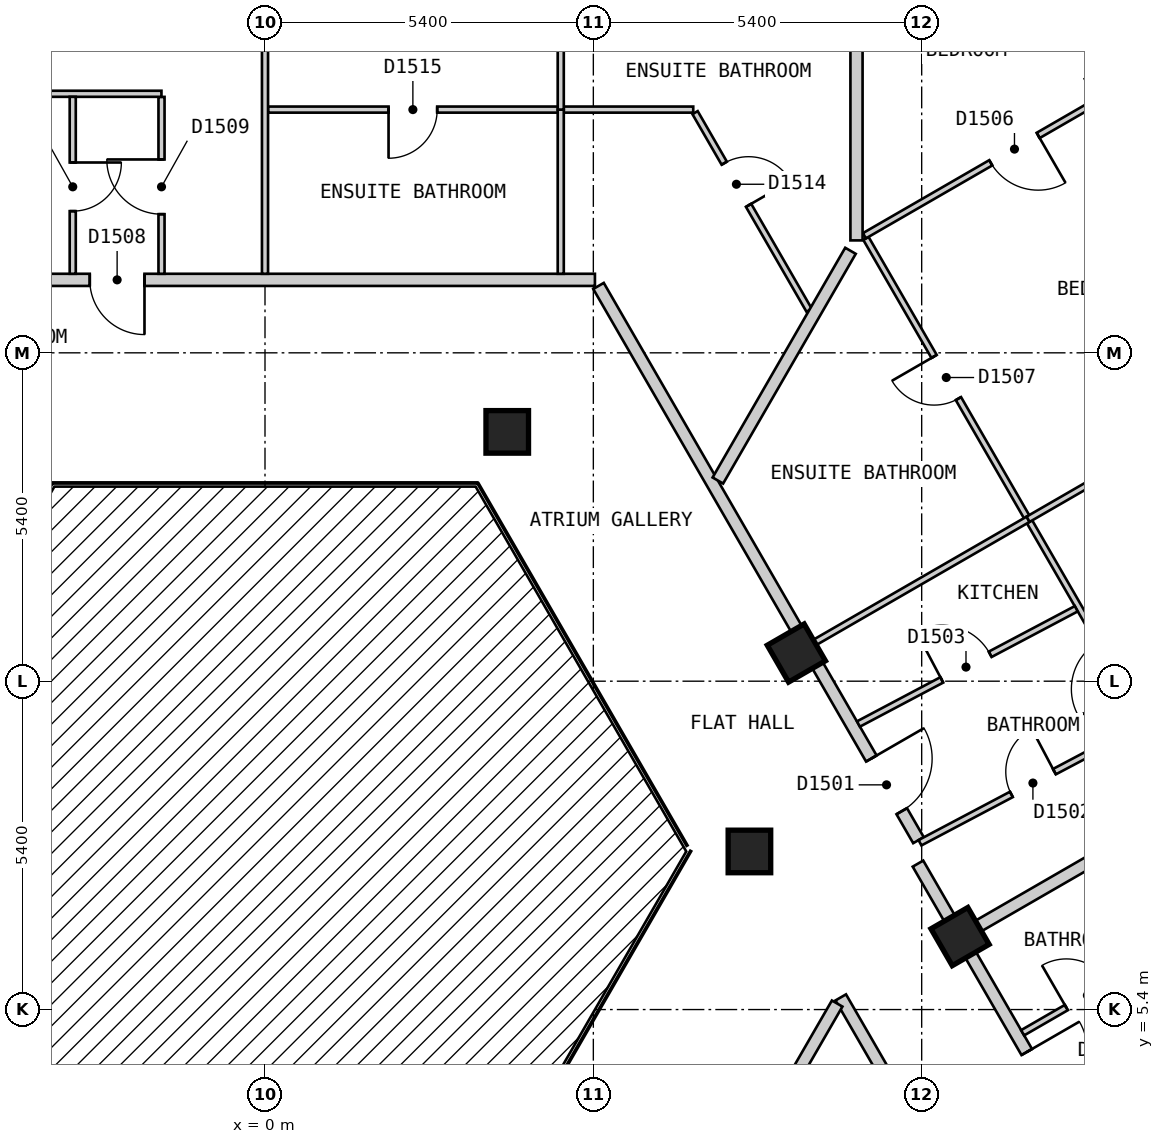
"""IFC4 building model, lengths in metres.
Left out: names, types, materials, properties, quantities, classifications, styles, units other than length and angle.
Written with IfcOpenShell. Run it as: python <this file> out.ifc"""

import sys

from ifc_helpers import new_model, si_unit, direction, frame, frame_2d, origin, origin_2d, place, context, subcontext, project, spatial, rectangle, extrude, element, fill, save


model = new_model("IFC4")
c1 = context("Model", 3, precision=1e-05, world=origin(), true_north=direction((0.0, 1.0)))
c2 = subcontext(c1, "Body", "Model", "MODEL_VIEW")
j1 = project(units=[si_unit("LENGTHUNIT", "METRE"), si_unit("PLANEANGLEUNIT", "RADIAN")], contexts=[c1])
p1 = place(None, origin())
s1 = spatial("IfcSite", under=j1, at=p1, CompositionType="ELEMENT")
p2 = place(p1, origin())
s2 = spatial("IfcBuilding", under=s1, at=p2, CompositionType="ELEMENT")
p3 = place(p2, frame((0.0, 0.0, 196.2)))
s3 = spatial("IfcBuildingStorey", under=s2, at=p3, CompositionType="ELEMENT", Elevation=196.2)
for number, where, z_axis, x_axis in (
    (1, (11.431, 6.6, 0.0), (0.0, 0.0, 1.0), (-0.5, 0.866, 0.0)),
    (2, (7.967, 8.0, 0.0), (0.0, 0.0, 1.0), (1.0, 0.0, 0.0)),
    (3, (8.739, 11.263, 0.0), (0.0, 0.0, 1.0), (-0.5, 0.866, 0.0)),
    (4, (3.984, 14.9, 0.0), (0.0, 0.0, 1.0), (1.0, 0.0, 0.0)),
):
    element("IfcColumn", number, at=place(p3, frame(where, z_axis=z_axis, x_axis=x_axis)), inside=s3, PredefinedType="COLUMN", context=c2, shape_type="SweptSolid", body=[
        extrude(rectangle(XDim=0.7, YDim=0.7, at=origin_2d()), origin(), (0.0, 0.0, 1.0), 3.0),
    ])
p4 = place(p3, frame((9.469, 5.6, 0.0), z_axis=(0.0, 0.0, 1.0), x_axis=(0.499964524401, -0.866045884662, 0.0)))
e5 = element("IfcWall", 5, at=p4, inside=s3, PredefinedType="PARTITIONING", context=c2, shape_type="SweptSolid", body=[
    extrude(rectangle(XDim=7.042, YDim=0.2, at=frame_2d((3.521, 0.0))), origin(), (0.0, 0.0, 1.0), 2.6),
])
p5 = place(p4, frame((3.129, 0.0, 0.0)))
e6 = element("IfcOpeningElement", 6, at=p5, cuts=e5, PredefinedType="OPENING", context=c2, shape_type="SweptSolid", body=[
    extrude(rectangle(XDim=0.9, YDim=2.1, at=frame_2d((0.45, 1.05))), frame((0.0, 0.11, 0.0), z_axis=(0.0, -1.0, 0.0), x_axis=(1.0, 0.0, 0.0)), (0.0, 0.0, 1.0), 0.22),
])
p6 = place(p3, frame((10.739, 7.8, 0.0), z_axis=(0.0, 0.0, 1.0), x_axis=(0.500023726918, -0.866011704609, 0.0)))
e7 = element("IfcWall", 7, at=p6, inside=s3, PredefinedType="PARTITIONING", context=c2, shape_type="SweptSolid", body=[
    extrude(rectangle(XDim=9.47, YDim=0.2, at=frame_2d((4.735, 0.0))), origin(), (0.0, 0.0, 1.0), 2.6),
])
p7 = place(p6, frame((8.168, 0.0, 0.0)))
e8 = element("IfcOpeningElement", 8, at=p7, cuts=e7, PredefinedType="OPENING", context=c2, shape_type="SweptSolid", body=[
    extrude(rectangle(XDim=1.0, YDim=2.1, at=frame_2d((0.5, 1.05))), frame((0.0, 0.11, 0.0), z_axis=(0.0, -1.0, 0.0), x_axis=(1.0, 0.0, 0.0)), (0.0, 0.0, 1.0), 0.22),
])
p8 = place(p6, frame((3.578, 0.0, 0.0)))
e9 = element("IfcOpeningElement", 9, at=p8, cuts=e7, PredefinedType="OPENING", context=c2, shape_type="SweptSolid", body=[
    extrude(rectangle(XDim=1.0, YDim=2.1, at=frame_2d((0.5, 1.05))), frame((0.0, 0.11, 0.0), z_axis=(0.0, -1.0, 0.0), x_axis=(1.0, 0.0, 0.0)), (0.0, 0.0, 1.0), 0.22),
])
p9 = place(p3, frame((5.485, 17.3, 0.0), z_axis=(0.0, 0.0, 1.0), x_axis=(0.499998905622, -0.866026035623, 0.0)))
e10 = element("IfcWall", 10, at=p9, inside=s3, PredefinedType="PARTITIONING", context=c2, shape_type="SweptSolid", body=[
    extrude(rectangle(XDim=10.524, YDim=0.2, at=frame_2d((5.262, 0.0))), origin(), (0.0, 0.0, 1.0), 2.6),
])
p10 = place(p9, frame((8.974, 0.0, 0.0)))
e11 = element("IfcOpeningElement", 11, at=p10, cuts=e10, PredefinedType="OPENING", context=c2, shape_type="SweptSolid", body=[
    extrude(rectangle(XDim=1.0, YDim=2.1, at=frame_2d((0.5, 1.05))), frame((0.0, 0.11, 0.0), z_axis=(0.0, -1.0, 0.0), x_axis=(1.0, 0.0, 0.0)), (0.0, 0.0, 1.0), 0.22),
])
p11 = place(p3, frame((-5.311, 17.4, 0.0), z_axis=(0.0, 0.0, 1.0), x_axis=(1.0, 0.0, 0.0)))
e12 = element("IfcWall", 12, at=p11, inside=s3, PredefinedType="PARTITIONING", context=c2, shape_type="SweptSolid", body=[
    extrude(rectangle(XDim=10.737, YDim=0.2, at=frame_2d((5.369, 0.0))), origin(), (0.0, 0.0, 1.0), 2.6),
])
p12 = place(p11, frame((2.429, 0.0, 0.0)))
e13 = element("IfcOpeningElement", 13, at=p12, cuts=e12, PredefinedType="OPENING", context=c2, shape_type="SweptSolid", body=[
    extrude(rectangle(XDim=0.9, YDim=2.1, at=frame_2d((0.45, 1.05))), frame((0.0, 0.11, 0.0), z_axis=(0.0, -1.0, 0.0), x_axis=(1.0, 0.0, 0.0)), (0.0, 0.0, 1.0), 0.22),
])
p13 = place(p3, frame((7.028, 1.373, 0.0), z_axis=(0.0, 0.0, 1.0), x_axis=(0.499953126767, 0.866052464367, 0.0)))
e14 = element("IfcWall", 14, at=p13, inside=s3, PredefinedType="PARTITIONING", context=c2, shape_type="SweptSolid", body=[
    extrude(rectangle(XDim=4.764, YDim=0.2, at=frame_2d((2.382, 0.0))), origin(), (0.0, 0.0, 1.0), 2.6),
])
p14 = place(p3, frame((7.073, 20.15, 0.0), z_axis=(0.0, 0.0, 1.0), x_axis=(0.499917691695, -0.866072919292, 0.0)))
e15 = element("IfcWall", 15, at=p14, inside=s3, PredefinedType="PARTITIONING", context=c2, shape_type="SweptSolid", body=[
    extrude(rectangle(XDim=3.753, YDim=0.1, at=frame_2d((1.876, 0.0))), origin(), (0.0, 0.0, 1.0), 2.6),
])
p15 = place(p14, frame((0.96, 0.0, 0.0)))
e16 = element("IfcOpeningElement", 16, at=p15, cuts=e15, PredefinedType="OPENING", context=c2, shape_type="SweptSolid", body=[
    extrude(rectangle(XDim=0.8, YDim=2.1, at=frame_2d((0.4, 1.05))), frame((0.0, 0.06, 0.0), z_axis=(0.0, -1.0, 0.0), x_axis=(1.0, 0.0, 0.0)), (0.0, 0.0, 1.0), 0.12),
])
p16 = place(p3, frame((9.883, 18.082, 0.0), z_axis=(0.0, 0.0, 1.0), x_axis=(0.500004428835, -0.86602284678, 0.0)))
e17 = element("IfcWall", 17, at=p16, inside=s3, PredefinedType="PARTITIONING", context=c2, shape_type="SweptSolid", body=[
    extrude(rectangle(XDim=10.618, YDim=0.1, at=frame_2d((5.309, 0.0))), origin(), (0.0, 0.0, 1.0), 2.6),
])
p17 = place(p16, frame((7.657, 0.0, 0.0)))
e18 = element("IfcOpeningElement", 18, at=p17, cuts=e17, PredefinedType="OPENING", context=c2, shape_type="SweptSolid", body=[
    extrude(rectangle(XDim=0.9, YDim=2.1, at=frame_2d((0.45, 1.05))), frame((0.0, 0.06, 0.0), z_axis=(0.0, -1.0, 0.0), x_axis=(1.0, 0.0, 0.0)), (0.0, 0.0, 1.0), 0.12),
])
p18 = place(p16, frame((2.242, 0.0, 0.0)))
e19 = element("IfcOpeningElement", 19, at=p18, cuts=e17, PredefinedType="OPENING", context=c2, shape_type="SweptSolid", body=[
    extrude(rectangle(XDim=0.8, YDim=2.1, at=frame_2d((0.4, 1.05))), frame((0.0, 0.06, 0.0), z_axis=(0.0, -1.0, 0.0), x_axis=(1.0, 0.0, 0.0)), (0.0, 0.0, 1.0), 0.12),
])
p19 = place(p3, frame((-1.702, 20.409, 0.0), z_axis=(0.0, 0.0, 1.0), x_axis=(0.0, -1.0, 0.0)))
e20 = element("IfcWall", 20, at=p19, inside=s3, PredefinedType="PARTITIONING", context=c2, shape_type="SweptSolid", body=[
    extrude(rectangle(XDim=2.909, YDim=0.1, at=frame_2d((1.455, 0.0))), origin(), (0.0, 0.0, 1.0), 2.6),
])
p20 = place(p19, frame((1.029, 0.0, 0.0)))
e21 = element("IfcOpeningElement", 21, at=p20, cuts=e20, PredefinedType="OPENING", context=c2, shape_type="SweptSolid", body=[
    extrude(rectangle(XDim=0.9, YDim=2.1, at=frame_2d((0.45, 1.05))), frame((0.0, 0.06, 0.0), z_axis=(0.0, -1.0, 0.0), x_axis=(1.0, 0.0, 0.0)), (0.0, 0.0, 1.0), 0.12),
])
p21 = place(p3, frame((0.05, 20.2, 0.0), z_axis=(0.0, 0.0, 1.0), x_axis=(1.0, 0.0, 0.0)))
e22 = element("IfcWall", 22, at=p21, inside=s3, PredefinedType="PARTITIONING", context=c2, shape_type="SweptSolid", body=[
    extrude(rectangle(XDim=6.993, YDim=0.1, at=frame_2d((3.497, 0.0))), origin(), (0.0, 0.0, 1.0), 2.6),
])
p22 = place(p21, frame((1.982, 0.0, 0.0)))
e23 = element("IfcOpeningElement", 23, at=p22, cuts=e22, PredefinedType="OPENING", context=c2, shape_type="SweptSolid", body=[
    extrude(rectangle(XDim=0.8, YDim=2.1, at=frame_2d((0.4, 1.05))), frame((0.0, 0.06, 0.0), z_axis=(0.0, -1.0, 0.0), x_axis=(1.0, 0.0, 0.0)), (0.0, 0.0, 1.0), 0.12),
])
p23 = place(p3, frame((-4.814, 20.46, 0.0), z_axis=(0.0, 0.0, 1.0), x_axis=(1.0, 0.0, 0.0)))
e24 = element("IfcWall", 24, at=p23, inside=s3, PredefinedType="PARTITIONING", context=c2, shape_type="SweptSolid", body=[
    extrude(rectangle(XDim=3.111, YDim=0.1, at=frame_2d((1.556, 0.0))), origin(), (0.0, 0.0, 1.0), 2.6),
])
p24 = place(p3, frame((4.864, 17.5, 0.0), z_axis=(0.0, 0.0, 1.0), x_axis=(0.0, 1.0, 0.0)))
e25 = element("IfcWall", 25, at=p24, inside=s3, PredefinedType="PARTITIONING", context=c2, shape_type="SweptSolid", body=[
    extrude(rectangle(XDim=2.7, YDim=0.1, at=frame_2d((1.35, 0.0))), origin(), (0.0, 0.0, 1.0), 2.6),
])
p25 = place(p3, frame((0.0, 17.5, 0.0), z_axis=(0.0, 0.0, 1.0), x_axis=(0.0, 1.0, 0.0)))
e26 = element("IfcWall", 26, at=p25, inside=s3, PredefinedType="PARTITIONING", context=c2, shape_type="SweptSolid", body=[
    extrude(rectangle(XDim=6.4, YDim=0.1, at=frame_2d((3.2, 0.0))), origin(), (0.0, 0.0, 1.0), 2.6),
])
p26 = place(p25, frame((4.1, 0.0, 0.0)))
e27 = element("IfcOpeningElement", 27, at=p26, cuts=e26, PredefinedType="OPENING", context=c2, shape_type="SweptSolid", body=[
    extrude(rectangle(XDim=0.9, YDim=2.1, at=frame_2d((0.45, 1.05))), frame((0.0, 0.06, 0.0), z_axis=(0.0, -1.0, 0.0), x_axis=(1.0, 0.0, 0.0)), (0.0, 0.0, 1.0), 0.12),
])
p27 = place(p3, frame((-3.162, 17.5, 0.0), z_axis=(0.0, 0.0, 1.0), x_axis=(0.0, 1.0, 0.0)))
e28 = element("IfcWall", 28, at=p27, inside=s3, PredefinedType="PARTITIONING", context=c2, shape_type="SweptSolid", body=[
    extrude(rectangle(XDim=2.91, YDim=0.1, at=frame_2d((1.455, 0.0))), origin(), (0.0, 0.0, 1.0), 2.6),
])
p28 = place(p27, frame((1.03, 0.0, 0.0)))
e29 = element("IfcOpeningElement", 29, at=p28, cuts=e28, PredefinedType="OPENING", context=c2, shape_type="SweptSolid", body=[
    extrude(rectangle(XDim=0.8, YDim=2.1, at=frame_2d((0.4, 1.05))), frame((0.0, 0.06, 0.0), z_axis=(0.0, -1.0, 0.0), x_axis=(1.0, 0.0, 0.0)), (0.0, 0.0, 1.0), 0.12),
])
p29 = place(p3, frame((9.76, 10.096, 0.0), z_axis=(0.0, 0.0, 1.0), x_axis=(0.883925629136, 0.467627503636, 0.0)))
e30 = element("IfcWall", 30, at=p29, inside=s3, PredefinedType="PARTITIONING", context=c2, shape_type="SweptSolid", body=[
    extrude(rectangle(XDim=4.052, YDim=0.1, at=frame_2d((2.026, 0.0))), origin(), (0.0, 0.0, 1.0), 2.6),
])
p30 = place(p29, frame((1.551, 0.0, 0.0)))
e31 = element("IfcOpeningElement", 31, at=p30, cuts=e30, PredefinedType="OPENING", context=c2, shape_type="SweptSolid", body=[
    extrude(rectangle(XDim=0.9, YDim=2.1, at=frame_2d((0.45, 1.05))), frame((0.0, 0.06, 0.0), z_axis=(0.0, -1.0, 0.0), x_axis=(1.0, 0.0, 0.0)), (0.0, 0.0, 1.0), 0.12),
])
p31 = place(p3, frame((10.772, 8.143, 0.0), z_axis=(0.0, 0.0, 1.0), x_axis=(0.884049480227, 0.467393320995, 0.0)))
e32 = element("IfcWall", 32, at=p31, inside=s3, PredefinedType="PARTITIONING", context=c2, shape_type="SweptSolid", body=[
    extrude(rectangle(XDim=4.153, YDim=0.1, at=frame_2d((2.076, 0.0))), origin(), (0.0, 0.0, 1.0), 2.6),
])
p32 = place(p31, frame((1.701, 0.0, 0.0)))
e33 = element("IfcOpeningElement", 33, at=p32, cuts=e32, PredefinedType="OPENING", context=c2, shape_type="SweptSolid", body=[
    extrude(rectangle(XDim=0.8, YDim=2.1, at=frame_2d((0.4, 1.05))), frame((0.0, 0.06, 0.0), z_axis=(0.0, -1.0, 0.0), x_axis=(1.0, 0.0, 0.0)), (0.0, 0.0, 1.0), 0.12),
])
p33 = place(p3, frame((13.268, 3.619, 0.0), z_axis=(0.0, 0.0, 1.0), x_axis=(0.865902724456, 0.500212426655, 0.0)))
e34 = element("IfcWall", 34, at=p33, inside=s3, PredefinedType="PARTITIONING", context=c2, shape_type="SweptSolid", body=[
    extrude(rectangle(XDim=2.559, YDim=0.1, at=frame_2d((1.28, 0.0))), origin(), (0.0, 0.0, 1.0), 2.6),
])
p34 = place(p33, frame((0.78, 0.0, 0.0)))
e35 = element("IfcOpeningElement", 35, at=p34, cuts=e34, PredefinedType="OPENING", context=c2, shape_type="SweptSolid", body=[
    extrude(rectangle(XDim=0.9, YDim=2.1, at=frame_2d((0.45, 1.05))), frame((0.0, 0.06, 0.0), z_axis=(0.0, -1.0, 0.0), x_axis=(1.0, 0.0, 0.0)), (0.0, 0.0, 1.0), 0.12),
])
p35 = place(p3, frame((12.46, 5.018, 0.0), z_axis=(0.0, 0.0, 1.0), x_axis=(0.866080321209, 0.499904868165, 0.0)))
e36 = element("IfcWall", 36, at=p35, inside=s3, PredefinedType="PARTITIONING", context=c2, shape_type="SweptSolid", body=[
    extrude(rectangle(XDim=2.51, YDim=0.1, at=frame_2d((1.255, 0.0))), origin(), (0.0, 0.0, 1.0), 2.6),
])
p36 = place(p35, frame((0.83, 0.0, 0.0)))
e37 = element("IfcOpeningElement", 37, at=p36, cuts=e36, PredefinedType="OPENING", context=c2, shape_type="SweptSolid", body=[
    extrude(rectangle(XDim=0.8, YDim=2.1, at=frame_2d((0.4, 1.05))), frame((0.0, 0.06, 0.0), z_axis=(0.0, -1.0, 0.0), x_axis=(1.0, 0.0, 0.0)), (0.0, 0.0, 1.0), 0.12),
])
p37 = place(p3, frame((8.999, 11.413, 0.0), z_axis=(0.0, 0.0, 1.0), x_axis=(0.86606561423, 0.499930346997, 0.0)))
e38 = element("IfcWall", 38, at=p37, inside=s3, PredefinedType="PARTITIONING", context=c2, shape_type="SweptSolid", body=[
    extrude(rectangle(XDim=4.1, YDim=0.1, at=frame_2d((2.05, 0.0))), origin(), (0.0, 0.0, 1.0), 2.6),
])
p38 = place(p3, frame((9.858, 18.125, 0.0), z_axis=(0.0, 0.0, 1.0), x_axis=(0.866004402611, 0.500036373335, 0.0)))
e39 = element("IfcWall", 39, at=p38, inside=s3, PredefinedType="PARTITIONING", context=c2, shape_type="SweptSolid", body=[
    extrude(rectangle(XDim=5.7, YDim=0.1, at=frame_2d((2.85, 0.0))), origin(), (0.0, 0.0, 1.0), 2.6),
])
p39 = place(p38, frame((2.4, 0.0, 0.0)))
e40 = element("IfcOpeningElement", 40, at=p39, cuts=e39, PredefinedType="OPENING", context=c2, shape_type="SweptSolid", body=[
    extrude(rectangle(XDim=0.9, YDim=2.1, at=frame_2d((0.45, 1.05))), frame((0.0, 0.06, 0.0), z_axis=(0.0, -1.0, 0.0), x_axis=(1.0, 0.0, 0.0)), (0.0, 0.0, 1.0), 0.12),
])
p40 = place(p3, frame((7.448, 14.1, 0.0), z_axis=(0.0, 0.0, 1.0), x_axis=(0.499961462843, 0.866047652079, 0.0)))
e41 = element("IfcWall", 41, at=p40, inside=s3, PredefinedType="PARTITIONING", context=c2, shape_type="SweptSolid", body=[
    extrude(rectangle(XDim=4.362, YDim=0.2, at=frame_2d((2.181, 0.0))), origin(), (0.0, 0.0, 1.0), 2.6),
])
p41 = place(p3, frame((9.728, 18.049, 0.0), z_axis=(0.0, 0.0, 1.0), x_axis=(0.0, 1.0, 0.0)))
e42 = element("IfcWall", 42, at=p41, inside=s3, PredefinedType="PARTITIONING", context=c2, shape_type="SweptSolid", body=[
    extrude(rectangle(XDim=5.851, YDim=0.2, at=frame_2d((2.925, 0.0))), origin(), (0.0, 0.0, 1.0), 2.6),
])
p42 = place(p3, frame((11.518, 6.65, 0.0), z_axis=(0.0, 0.0, 1.0), x_axis=(0.866016855193, 0.500014806302, 0.0)))
e43 = element("IfcWall", 43, at=p42, inside=s3, PredefinedType="PARTITIONING", context=c2, shape_type="SweptSolid", body=[
    extrude(rectangle(XDim=10.0, YDim=0.2, at=frame_2d((5.0, 0.0))), origin(), (0.0, 0.0, 1.0), 2.6),
])
p43 = place(p3, frame((12.55, 13.463, 0.0), z_axis=(0.0, 0.0, 1.0), x_axis=(0.866004402611, 0.500036373335, 0.0)))
e44 = element("IfcWall", 44, at=p43, inside=s3, PredefinedType="PARTITIONING", context=c2, shape_type="SweptSolid", body=[
    extrude(rectangle(XDim=5.7, YDim=0.1, at=frame_2d((2.85, 0.0))), origin(), (0.0, 0.0, 1.0), 2.6),
])
p44 = place(p43, frame((2.4, 0.0, 0.0)))
e45 = element("IfcOpeningElement", 45, at=p44, cuts=e44, PredefinedType="OPENING", context=c2, shape_type="SweptSolid", body=[
    extrude(rectangle(XDim=0.9, YDim=2.1, at=frame_2d((0.45, 1.05))), frame((0.0, 0.06, 0.0), z_axis=(0.0, -1.0, 0.0), x_axis=(1.0, 0.0, 0.0)), (0.0, 0.0, 1.0), 0.12),
])
p45 = place(p3, frame((4.864, 20.2, 0.0), z_axis=(0.0, 0.0, 1.0), x_axis=(0.0, 1.0, 0.0)))
e46 = element("IfcWall", 46, at=p45, inside=s3, PredefinedType="PARTITIONING", context=c2, shape_type="SweptSolid", body=[
    extrude(rectangle(XDim=3.7, YDim=0.1, at=frame_2d((1.85, 0.0))), origin(), (0.0, 0.0, 1.0), 2.6),
])
p46 = place(p45, frame((1.4, 0.0, 0.0)))
e47 = element("IfcOpeningElement", 47, at=p46, cuts=e46, PredefinedType="OPENING", context=c2, shape_type="SweptSolid", body=[
    extrude(rectangle(XDim=0.9, YDim=2.1, at=frame_2d((0.45, 1.05))), frame((0.0, 0.06, 0.0), z_axis=(0.0, -1.0, 0.0), x_axis=(1.0, 0.0, 0.0)), (0.0, 0.0, 1.0), 0.12),
])
p47 = place(p10, origin())
e48 = element("IfcDoor", 48, at=p47, inside=s3, OperationType="SINGLE_SWING_LEFT", PredefinedType="DOOR", context=c2, shape_type="SweptSolid", body=[
    extrude(rectangle(XDim=1.0, YDim=2.1, at=frame_2d((0.5, 1.05))), frame((0.0, 0.025, 0.0), z_axis=(0.0, -1.0, 0.0), x_axis=(1.0, 0.0, 0.0)), (0.0, 0.0, 1.0), 0.05),
])
fill(e11, e48)
p48 = place(p32, origin())
e49 = element("IfcDoor", 49, at=p48, inside=s3, OperationType="SINGLE_SWING_RIGHT", PredefinedType="DOOR", context=c2, shape_type="SweptSolid", body=[
    extrude(rectangle(XDim=0.8, YDim=2.1, at=frame_2d((0.4, 1.05))), frame((0.0, 0.025, 0.0), z_axis=(0.0, -1.0, 0.0), x_axis=(1.0, 0.0, 0.0)), (0.0, 0.0, 1.0), 0.05),
])
fill(e33, e49)
p49 = place(p30, origin())
e50 = element("IfcDoor", 50, at=p49, inside=s3, OperationType="SINGLE_SWING_LEFT", PredefinedType="DOOR", context=c2, shape_type="SweptSolid", body=[
    extrude(rectangle(XDim=0.9, YDim=2.1, at=frame_2d((0.45, 1.05))), frame((0.0, 0.025, 0.0), z_axis=(0.0, -1.0, 0.0), x_axis=(1.0, 0.0, 0.0)), (0.0, 0.0, 1.0), 0.05),
])
fill(e31, e50)
p50 = place(p39, origin())
e51 = element("IfcDoor", 51, at=p50, inside=s3, OperationType="SINGLE_SWING_RIGHT", PredefinedType="DOOR", context=c2, shape_type="SweptSolid", body=[
    extrude(rectangle(XDim=0.9, YDim=2.1, at=frame_2d((0.45, 1.05))), frame((0.0, 0.025, 0.0), z_axis=(0.0, -1.0, 0.0), x_axis=(1.0, 0.0, 0.0)), (0.0, 0.0, 1.0), 0.05),
])
fill(e40, e51)
p51 = place(p18, origin())
e52 = element("IfcDoor", 52, at=p51, inside=s3, OperationType="SINGLE_SWING_LEFT", PredefinedType="DOOR", context=c2, shape_type="SweptSolid", body=[
    extrude(rectangle(XDim=0.8, YDim=2.1, at=frame_2d((0.4, 1.05))), frame((0.0, 0.025, 0.0), z_axis=(0.0, -1.0, 0.0), x_axis=(1.0, 0.0, 0.0)), (0.0, 0.0, 1.0), 0.05),
])
fill(e19, e52)
p52 = place(p12, origin())
e53 = element("IfcDoor", 53, at=p52, inside=s3, OperationType="SINGLE_SWING_RIGHT", PredefinedType="DOOR", context=c2, shape_type="SweptSolid", body=[
    extrude(rectangle(XDim=0.9, YDim=2.1, at=frame_2d((0.45, 1.05))), frame((0.0, 0.025, 0.0), z_axis=(0.0, -1.0, 0.0), x_axis=(1.0, 0.0, 0.0)), (0.0, 0.0, 1.0), 0.05),
])
fill(e13, e53)
p53 = place(p20, origin())
e54 = element("IfcDoor", 54, at=p53, inside=s3, OperationType="SINGLE_SWING_LEFT", PredefinedType="DOOR", context=c2, shape_type="SweptSolid", body=[
    extrude(rectangle(XDim=0.9, YDim=2.1, at=frame_2d((0.45, 1.05))), frame((0.0, 0.025, 0.0), z_axis=(0.0, -1.0, 0.0), x_axis=(1.0, 0.0, 0.0)), (0.0, 0.0, 1.0), 0.05),
])
fill(e21, e54)
p54 = place(p28, origin())
e55 = element("IfcDoor", 55, at=p54, inside=s3, OperationType="SINGLE_SWING_RIGHT", PredefinedType="DOOR", context=c2, shape_type="SweptSolid", body=[
    extrude(rectangle(XDim=0.8, YDim=2.1, at=frame_2d((0.4, 1.05))), frame((0.0, 0.025, 0.0), z_axis=(0.0, -1.0, 0.0), x_axis=(1.0, 0.0, 0.0)), (0.0, 0.0, 1.0), 0.05),
])
fill(e29, e55)
p55 = place(p15, origin())
e56 = element("IfcDoor", 56, at=p55, inside=s3, OperationType="SINGLE_SWING_RIGHT", PredefinedType="DOOR", context=c2, shape_type="SweptSolid", body=[
    extrude(rectangle(XDim=0.8, YDim=2.1, at=frame_2d((0.4, 1.05))), frame((0.0, 0.025, 0.0), z_axis=(0.0, -1.0, 0.0), x_axis=(1.0, 0.0, 0.0)), (0.0, 0.0, 1.0), 0.05),
])
fill(e16, e56)
p56 = place(p22, origin())
e57 = element("IfcDoor", 57, at=p56, inside=s3, OperationType="SINGLE_SWING_LEFT", PredefinedType="DOOR", context=c2, shape_type="SweptSolid", body=[
    extrude(rectangle(XDim=0.8, YDim=2.1, at=frame_2d((0.4, 1.05))), frame((0.0, 0.025, 0.0), z_axis=(0.0, -1.0, 0.0), x_axis=(1.0, 0.0, 0.0)), (0.0, 0.0, 1.0), 0.05),
])
fill(e23, e57)
p57 = place(p8, origin())
e58 = element("IfcDoor", 58, at=p57, inside=s3, OperationType="SINGLE_SWING_LEFT", PredefinedType="DOOR", context=c2, shape_type="SweptSolid", body=[
    extrude(rectangle(XDim=1.0, YDim=2.1, at=frame_2d((0.5, 1.05))), frame((0.0, 0.025, 0.0), z_axis=(0.0, -1.0, 0.0), x_axis=(1.0, 0.0, 0.0)), (0.0, 0.0, 1.0), 0.05),
])
fill(e9, e58)
p58 = place(p36, origin())
e59 = element("IfcDoor", 59, at=p58, inside=s3, OperationType="SINGLE_SWING_LEFT", PredefinedType="DOOR", context=c2, shape_type="SweptSolid", body=[
    extrude(rectangle(XDim=0.8, YDim=2.1, at=frame_2d((0.4, 1.05))), frame((0.0, 0.025, 0.0), z_axis=(0.0, -1.0, 0.0), x_axis=(1.0, 0.0, 0.0)), (0.0, 0.0, 1.0), 0.05),
])
fill(e37, e59)
save(model, sys.argv[1])
